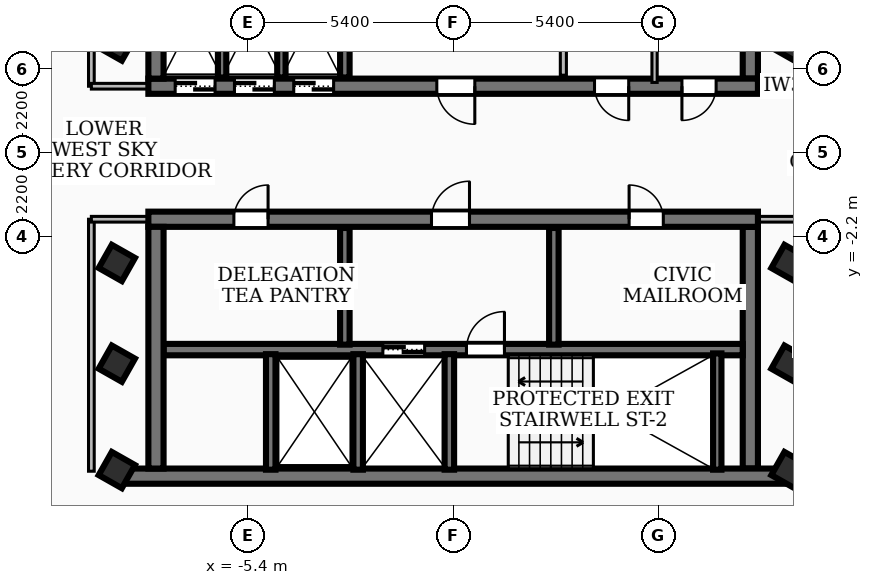
"""IFC4 building model, lengths in metres.
Left out: names, types, materials, properties, quantities, classifications, styles, units other than length and angle.
Written with IfcOpenShell. Run it as: python <this file> out.ifc"""

import sys

from ifc_helpers import new_model, si_unit, direction, frame, frame_2d, origin, origin_2d, place, context, subcontext, project, spatial, rectangle, extrude, element, fill, save


model = new_model("IFC4")
c1 = context("Model", 3, precision=1e-05, world=origin(), true_north=direction((0.0, 1.0)))
c2 = subcontext(c1, "Body", "Model", "MODEL_VIEW")
j1 = project(units=[si_unit("LENGTHUNIT", "METRE"), si_unit("PLANEANGLEUNIT", "RADIAN")], contexts=[c1])
p1 = place(None, origin())
s1 = spatial("IfcSite", under=j1, at=p1, CompositionType="ELEMENT")
p2 = place(p1, origin())
s2 = spatial("IfcBuilding", under=s1, at=p2, CompositionType="ELEMENT")
p3 = place(p2, frame((0.0, 0.0, 281.7)))
s3 = spatial("IfcBuildingStorey", under=s2, at=p3, CompositionType="ELEMENT", Elevation=281.7)
p4 = place(p3, frame((8.02, 1.75, 0.0), z_axis=(0.0, 0.0, 1.0), x_axis=(-1.0, 0.0, 0.0)))
e1 = element("IfcWall", 1, at=p4, inside=s3, PredefinedType="SHEAR", context=c2, shape_type="SweptSolid", body=[
    extrude(rectangle(XDim=16.04, YDim=0.4, at=frame_2d((8.02, 0.0))), origin(), (0.0, 0.0, 1.0), 3.12),
])
p5 = place(p4, frame((7.45, 0.0, 0.0)))
e2 = element("IfcOpeningElement", 2, at=p5, cuts=e1, PredefinedType="OPENING", context=c2, shape_type="SweptSolid", body=[
    extrude(rectangle(XDim=1.0, YDim=2.1, at=frame_2d((0.5, 1.05))), frame((0.0, 0.21, 0.0), z_axis=(0.0, -1.0, 0.0), x_axis=(1.0, 0.0, 0.0)), (0.0, 0.0, 1.0), 0.42),
])
p6 = place(p4, frame((14.285, 0.0, 0.0)))
e3 = element("IfcOpeningElement", 3, at=p6, cuts=e1, PredefinedType="OPENING", context=c2, shape_type="SweptSolid", body=[
    extrude(rectangle(XDim=1.05, YDim=2.15, at=frame_2d((0.525, 1.075))), frame((0.0, 0.21, 0.0), z_axis=(0.0, -1.0, 0.0), x_axis=(1.0, 0.0, 0.0)), (0.0, 0.0, 1.0), 0.42),
])
p7 = place(p4, frame((12.725, 0.0, 0.0)))
e4 = element("IfcOpeningElement", 4, at=p7, cuts=e1, PredefinedType="OPENING", context=c2, shape_type="SweptSolid", body=[
    extrude(rectangle(XDim=1.05, YDim=2.15, at=frame_2d((0.525, 1.075))), frame((0.0, 0.21, 0.0), z_axis=(0.0, -1.0, 0.0), x_axis=(1.0, 0.0, 0.0)), (0.0, 0.0, 1.0), 0.42),
])
p8 = place(p4, frame((11.165, 0.0, 0.0)))
e5 = element("IfcOpeningElement", 5, at=p8, cuts=e1, PredefinedType="OPENING", context=c2, shape_type="SweptSolid", body=[
    extrude(rectangle(XDim=1.05, YDim=2.15, at=frame_2d((0.525, 1.075))), frame((0.0, 0.21, 0.0), z_axis=(0.0, -1.0, 0.0), x_axis=(1.0, 0.0, 0.0)), (0.0, 0.0, 1.0), 0.42),
])
p9 = place(p4, frame((3.4, 0.0, 0.0)))
e6 = element("IfcOpeningElement", 6, at=p9, cuts=e1, PredefinedType="OPENING", context=c2, shape_type="SweptSolid", body=[
    extrude(rectangle(XDim=0.9, YDim=2.06, at=frame_2d((0.45, 1.03))), frame((0.0, 0.21, 0.0), z_axis=(0.0, -1.0, 0.0), x_axis=(1.0, 0.0, 0.0)), (0.0, 0.0, 1.0), 0.42),
])
p10 = place(p4, frame((1.1, 0.0, 0.0)))
e7 = element("IfcOpeningElement", 7, at=p10, cuts=e1, PredefinedType="OPENING", context=c2, shape_type="SweptSolid", body=[
    extrude(rectangle(XDim=0.9, YDim=2.06, at=frame_2d((0.45, 1.03))), frame((0.0, 0.21, 0.0), z_axis=(0.0, -1.0, 0.0), x_axis=(1.0, 0.0, 0.0)), (0.0, 0.0, 1.0), 0.42),
])
for number, where, z_axis, x_axis in (
    (8, (-7.82, 1.95, 0.0), (0.0, 0.0, 1.0), (0.0, 1.0, 0.0)),
    (9, (7.82, 8.31, 0.0), (0.0, 0.0, 1.0), (0.0, -1.0, 0.0)),
):
    element("IfcWall", number, at=place(p3, frame(where, z_axis=z_axis, x_axis=x_axis)), inside=s3, PredefinedType="SHEAR", context=c2, shape_type="SweptSolid", body=[
        extrude(rectangle(XDim=6.36, YDim=0.4, at=frame_2d((3.18, 0.0))), origin(), (0.0, 0.0, 1.0), 3.12),
    ])
p11 = place(p3, frame((8.78, -8.51, 0.0), z_axis=(0.0, 0.0, 1.0), x_axis=(-1.0, 0.0, 0.0)))
e10 = element("IfcWall", 10, at=p11, inside=s3, PredefinedType="SHEAR", context=c2, shape_type="SweptSolid", body=[
    extrude(rectangle(XDim=17.56, YDim=0.4, at=frame_2d((8.78, 0.0))), origin(), (0.0, 0.0, 1.0), 3.12),
])
p12 = place(p3, frame((-8.02, -1.75, 0.0), z_axis=(0.0, 0.0, 1.0), x_axis=(1.0, 0.0, 0.0)))
e11 = element("IfcWall", 11, at=p12, inside=s3, PredefinedType="SHEAR", context=c2, shape_type="SweptSolid", body=[
    extrude(rectangle(XDim=16.04, YDim=0.4, at=frame_2d((8.02, 0.0))), origin(), (0.0, 0.0, 1.0), 3.12),
])
p13 = place(p12, frame((7.45, 0.0, 0.0)))
e12 = element("IfcOpeningElement", 12, at=p13, cuts=e11, PredefinedType="OPENING", context=c2, shape_type="SweptSolid", body=[
    extrude(rectangle(XDim=1.0, YDim=2.1, at=frame_2d((0.5, 1.05))), frame((0.0, 0.21, 0.0), z_axis=(0.0, -1.0, 0.0), x_axis=(1.0, 0.0, 0.0)), (0.0, 0.0, 1.0), 0.42),
])
p14 = place(p12, frame((12.65, 0.0, 0.0)))
e13 = element("IfcOpeningElement", 13, at=p14, cuts=e11, PredefinedType="OPENING", context=c2, shape_type="SweptSolid", body=[
    extrude(rectangle(XDim=0.9, YDim=2.06, at=frame_2d((0.45, 1.03))), frame((0.0, 0.21, 0.0), z_axis=(0.0, -1.0, 0.0), x_axis=(1.0, 0.0, 0.0)), (0.0, 0.0, 1.0), 0.42),
])
p15 = place(p12, frame((2.25, 0.0, 0.0)))
e14 = element("IfcOpeningElement", 14, at=p15, cuts=e11, PredefinedType="OPENING", context=c2, shape_type="SweptSolid", body=[
    extrude(rectangle(XDim=0.9, YDim=2.06, at=frame_2d((0.45, 1.03))), frame((0.0, 0.21, 0.0), z_axis=(0.0, -1.0, 0.0), x_axis=(1.0, 0.0, 0.0)), (0.0, 0.0, 1.0), 0.42),
])
for number, where, z_axis, x_axis in (
    (15, (-7.82, -8.31, 0.0), (0.0, 0.0, 1.0), (0.0, 1.0, 0.0)),
    (16, (7.82, -1.95, 0.0), (0.0, 0.0, 1.0), (0.0, -1.0, 0.0)),
):
    element("IfcWall", number, at=place(p3, frame(where, z_axis=z_axis, x_axis=x_axis)), inside=s3, PredefinedType="SHEAR", context=c2, shape_type="SweptSolid", body=[
        extrude(rectangle(XDim=6.36, YDim=0.4, at=frame_2d((3.18, 0.0))), origin(), (0.0, 0.0, 1.0), 3.12),
    ])
p16 = place(p3, frame((-7.62, -5.18, 0.0), z_axis=(0.0, 0.0, 1.0), x_axis=(1.0, 0.0, 0.0)))
e17 = element("IfcWall", 17, at=p16, inside=s3, PredefinedType="SOLIDWALL", context=c2, shape_type="SweptSolid", body=[
    extrude(rectangle(XDim=15.24, YDim=0.3, at=frame_2d((7.62, 0.0))), origin(), (0.0, 0.0, 1.0), 3.12),
])
p17 = place(p16, frame((5.77, 0.0, 0.0)))
e18 = element("IfcOpeningElement", 18, at=p17, cuts=e17, PredefinedType="OPENING", context=c2, shape_type="SweptSolid", body=[
    extrude(rectangle(XDim=1.1, YDim=2.15, at=frame_2d((0.55, 1.075))), frame((0.0, 0.16, 0.0), z_axis=(0.0, -1.0, 0.0), x_axis=(1.0, 0.0, 0.0)), (0.0, 0.0, 1.0), 0.32),
])
p18 = place(p16, frame((7.97, 0.0, 0.0)))
e19 = element("IfcOpeningElement", 19, at=p18, cuts=e17, PredefinedType="OPENING", context=c2, shape_type="SweptSolid", body=[
    extrude(rectangle(XDim=1.0, YDim=2.1, at=frame_2d((0.5, 1.05))), frame((0.0, 0.16, 0.0), z_axis=(0.0, -1.0, 0.0), x_axis=(1.0, 0.0, 0.0)), (0.0, 0.0, 1.0), 0.32),
])
p19 = place(p3, frame((6.95, -8.34, 0.0), z_axis=(0.0, 0.0, 1.0), x_axis=(0.0, 1.0, 0.0)))
e20 = element("IfcWall", 20, at=p19, inside=s3, PredefinedType="SOLIDWALL", context=c2, shape_type="SweptSolid", body=[
    extrude(rectangle(XDim=3.06, YDim=0.22, at=frame_2d((1.53, 0.0))), origin(), (0.0, 0.0, 1.0), 3.12),
])
p20 = place(p3, frame((-2.85, 1.98, 0.0), z_axis=(0.0, 0.0, 1.0), x_axis=(0.0, 1.0, 0.0)))
e21 = element("IfcWall", 21, at=p20, inside=s3, PredefinedType="SOLIDWALL", context=c2, shape_type="SweptSolid", body=[
    extrude(rectangle(XDim=3.07, YDim=0.25, at=frame_2d((1.535, 0.0))), origin(), (0.0, 0.0, 1.0), 3.12),
])
for number, where, z_axis, x_axis in (
    (22, (-0.1, -8.34, 0.0), (0.0, 0.0, 1.0), (0.0, 1.0, 0.0)),
    (23, (-2.5, -8.34, 0.0), (0.0, 0.0, 1.0), (0.0, 1.0, 0.0)),
    (24, (-4.8, -8.34, 0.0), (0.0, 0.0, 1.0), (0.0, 1.0, 0.0)),
):
    element("IfcWall", number, at=place(p3, frame(where, z_axis=z_axis, x_axis=x_axis)), inside=s3, PredefinedType="SOLIDWALL", context=c2, shape_type="SweptSolid", body=[
        extrude(rectangle(XDim=3.04, YDim=0.25, at=frame_2d((1.52, 0.0))), origin(), (0.0, 0.0, 1.0), 3.12),
    ])
for number, where, z_axis, x_axis in (
    (25, (-2.85, -5.05, 0.0), (0.0, 0.0, 1.0), (0.0, 1.0, 0.0)),
    (26, (2.65, -5.05, 0.0), (0.0, 0.0, 1.0), (0.0, 1.0, 0.0)),
):
    element("IfcWall", number, at=place(p3, frame(where, z_axis=z_axis, x_axis=x_axis)), inside=s3, PredefinedType="SOLIDWALL", context=c2, shape_type="SweptSolid", body=[
        extrude(rectangle(XDim=3.07, YDim=0.25, at=frame_2d((1.535, 0.0))), origin(), (0.0, 0.0, 1.0), 3.12),
    ])
for number, where, z_axis, x_axis in (
    (27, (-6.08, 1.98, 0.0), (0.0, 0.0, 1.0), (0.0, 1.0, 0.0)),
    (28, (-4.52, 1.98, 0.0), (0.0, 0.0, 1.0), (0.0, 1.0, 0.0)),
):
    element("IfcWall", number, at=place(p3, frame(where, z_axis=z_axis, x_axis=x_axis)), inside=s3, PredefinedType="SOLIDWALL", context=c2, shape_type="SweptSolid", body=[
        extrude(rectangle(XDim=3.07, YDim=0.22, at=frame_2d((1.535, 0.0))), origin(), (0.0, 0.0, 1.0), 3.12),
    ])
for number, where, z_axis, x_axis in (
    (29, (-8.85, -5.55, 0.0), (0.0, 0.0, 1.0), (0.493, 0.87, 0.0)),
    (30, (-8.85, -2.9, 0.0), (0.0, 0.0, 1.0), (0.493, 0.87, 0.0)),
    (31, (-8.85, 2.9, 0.0), (0.0, 0.0, 1.0), (0.493, 0.87, 0.0)),
    (32, (8.85, -5.55, 0.0), (0.0, 0.0, 1.0), (0.493, 0.87, 0.0)),
    (33, (8.85, -2.9, 0.0), (0.0, 0.0, 1.0), (0.493, 0.87, 0.0)),
    (34, (8.85, 2.9, 0.0), (0.0, 0.0, 1.0), (0.493, 0.87, 0.0)),
    (35, (8.85, -8.35, 0.0), (0.0, 0.0, 1.0), (0.493, 0.87, 0.0)),
    (36, (-8.85, -8.35, 0.0), (0.0, 0.0, 1.0), (0.493, 0.87, 0.0)),
):
    element("IfcColumn", number, at=place(p3, frame(where, z_axis=z_axis, x_axis=x_axis)), inside=s3, PredefinedType="COLUMN", context=c2, shape_type="SweptSolid", body=[
        extrude(rectangle(XDim=0.7, YDim=0.7, at=origin_2d()), origin(), (0.0, 0.0, 1.0), 3.42),
    ])
p21 = place(p3, frame((4.16, -18.96, 0.0), z_axis=(0.0, 0.0, 1.0), x_axis=(-0.870210232131, 0.492680577956, 0.0)))
e37 = element("IfcWall", 37, at=p21, inside=s3, PredefinedType="SOLIDWALL", context=c2, shape_type="SweptSolid", body=[
    extrude(rectangle(XDim=25.923, YDim=0.2, at=frame_2d((12.962, 0.0))), origin(), (0.0, 0.0, 1.0), 3.12),
])
p22 = place(p21, frame((19.32, 0.0, 0.85)))
e38 = element("IfcOpeningElement", 38, at=p22, cuts=e37, PredefinedType="OPENING", context=c2, shape_type="SweptSolid", body=[
    extrude(rectangle(XDim=1.8, YDim=1.6, at=frame_2d((0.9, 0.8))), frame((0.0, 0.11, 0.0), z_axis=(0.0, -1.0, 0.0), x_axis=(1.0, 0.0, 0.0)), (0.0, 0.0, 1.0), 0.22),
])
p23 = place(p3, frame((2.9, 2.04, 0.0), z_axis=(0.0, 0.0, 1.0), x_axis=(0.0, 1.0, 0.0)))
e39 = element("IfcWall", 39, at=p23, inside=s3, PredefinedType="PARTITIONING", context=c2, shape_type="SweptSolid", body=[
    extrude(rectangle(XDim=2.94, YDim=0.16, at=frame_2d((1.47, 0.0))), origin(), (0.0, 0.0, 1.0), 2.35),
])
p24 = place(p23, frame((1.82, 0.0, 0.0)))
e40 = element("IfcOpeningElement", 40, at=p24, cuts=e39, PredefinedType="OPENING", context=c2, shape_type="SweptSolid", body=[
    extrude(rectangle(XDim=0.9, YDim=2.06, at=frame_2d((0.45, 1.03))), frame((0.0, 0.09, 0.0), z_axis=(0.0, -1.0, 0.0), x_axis=(1.0, 0.0, 0.0)), (0.0, 0.0, 1.0), 0.18),
])
p25 = place(p3, frame((5.3, 1.85, 0.0), z_axis=(0.0, 0.0, 1.0), x_axis=(0.0, 1.0, 0.0)))
e41 = element("IfcWall", 41, at=p25, inside=s3, PredefinedType="PARTITIONING", context=c2, shape_type="SweptSolid", body=[
    extrude(rectangle(XDim=1.89, YDim=0.138, at=frame_2d((0.945, 0.0))), origin(), (0.0, 0.0, 1.0), 2.35),
])
p26 = place(p3, frame((-9.52, 1.75, 0.0), z_axis=(0.0, 0.0, 1.0), x_axis=(0.0, 1.0, 0.0)))
e42 = element("IfcWall", 42, at=p26, inside=s3, PredefinedType="PARTITIONING", context=c2, shape_type="SweptSolid", body=[
    extrude(rectangle(XDim=6.63, YDim=0.15, at=frame_2d((3.315, 0.0))), origin(), (0.0, 0.0, 1.0), 2.49),
])
p27 = place(p3, frame((-7.85, 1.75, 0.0), z_axis=(0.0, 0.0, 1.0), x_axis=(-1.0, 0.0, 0.0)))
e43 = element("IfcWall", 43, at=p27, inside=s3, PredefinedType="PARTITIONING", context=c2, shape_type="SweptSolid", body=[
    extrude(rectangle(XDim=1.67, YDim=0.15, at=frame_2d((0.835, 0.0))), origin(), (0.0, 0.0, 1.0), 2.35),
])
p28 = place(p3, frame((-9.52, -8.38, 0.0), z_axis=(0.0, 0.0, 1.0), x_axis=(0.0, 1.0, 0.0)))
e44 = element("IfcWall", 44, at=p28, inside=s3, PredefinedType="PARTITIONING", context=c2, shape_type="SweptSolid", body=[
    extrude(rectangle(XDim=6.63, YDim=0.15, at=frame_2d((3.315, 0.0))), origin(), (0.0, 0.0, 1.0), 3.12),
])
for number, where, z_axis, x_axis in (
    (45, (-7.85, -1.75, 0.0), (0.0, 0.0, 1.0), (-1.0, 0.0, 0.0)),
    (46, (7.85, 1.75, 0.0), (0.0, 0.0, 1.0), (1.0, 0.0, 0.0)),
    (47, (7.85, -1.75, 0.0), (0.0, 0.0, 1.0), (1.0, 0.0, 0.0)),
):
    element("IfcWall", number, at=place(p3, frame(where, z_axis=z_axis, x_axis=x_axis)), inside=s3, PredefinedType="PARTITIONING", context=c2, shape_type="SweptSolid", body=[
        extrude(rectangle(XDim=1.67, YDim=0.15, at=frame_2d((0.835, 0.0))), origin(), (0.0, 0.0, 1.0), 2.35),
    ])
p29 = place(p3, frame((-17.619, -2.113, 0.0), z_axis=(0.0, 0.0, 1.0), x_axis=(0.492746831558, 0.870172718482, 0.0)))
e48 = element("IfcWall", 48, at=p29, inside=s3, PredefinedType="PARTITIONING", context=c2, shape_type="SweptSolid", body=[
    extrude(rectangle(XDim=20.54, YDim=0.11, at=frame_2d((10.27, 0.0))), origin(), (0.0, 0.0, 1.0), 2.49),
])
p30 = place(p29, frame((11.36, 0.0, 0.0)))
e49 = element("IfcOpeningElement", 49, at=p30, cuts=e48, PredefinedType="OPENING", context=c2, shape_type="SweptSolid", body=[
    extrude(rectangle(XDim=0.86, YDim=2.04, at=frame_2d((0.43, 1.02))), frame((0.0, 0.065, 0.0), z_axis=(0.0, -1.0, 0.0), x_axis=(1.0, 0.0, 0.0)), (0.0, 0.0, 1.0), 0.13),
])
p31 = place(p29, frame((9.92, 0.0, 0.0)))
e50 = element("IfcOpeningElement", 50, at=p31, cuts=e48, PredefinedType="OPENING", context=c2, shape_type="SweptSolid", body=[
    extrude(rectangle(XDim=0.86, YDim=2.04, at=frame_2d((0.43, 1.02))), frame((0.0, 0.065, 0.0), z_axis=(0.0, -1.0, 0.0), x_axis=(1.0, 0.0, 0.0)), (0.0, 0.0, 1.0), 0.13),
])
p32 = place(p3, frame((17.619, 2.113, 0.0), z_axis=(0.0, 0.0, 1.0), x_axis=(-0.492746831558, -0.870172718482, 0.0)))
e51 = element("IfcWall", 51, at=p32, inside=s3, PredefinedType="PARTITIONING", context=c2, shape_type="SweptSolid", body=[
    extrude(rectangle(XDim=20.54, YDim=0.11, at=frame_2d((10.27, 0.0))), origin(), (0.0, 0.0, 1.0), 2.49),
])
p33 = place(p32, frame((11.36, 0.0, 0.0)))
e52 = element("IfcOpeningElement", 52, at=p33, cuts=e51, PredefinedType="OPENING", context=c2, shape_type="SweptSolid", body=[
    extrude(rectangle(XDim=0.86, YDim=2.04, at=frame_2d((0.43, 1.02))), frame((0.0, 0.065, 0.0), z_axis=(0.0, -1.0, 0.0), x_axis=(1.0, 0.0, 0.0)), (0.0, 0.0, 1.0), 0.13),
])
p34 = place(p32, frame((9.92, 0.0, 0.0)))
e53 = element("IfcOpeningElement", 53, at=p34, cuts=e51, PredefinedType="OPENING", context=c2, shape_type="SweptSolid", body=[
    extrude(rectangle(XDim=0.86, YDim=2.04, at=frame_2d((0.43, 1.02))), frame((0.0, 0.065, 0.0), z_axis=(0.0, -1.0, 0.0), x_axis=(1.0, 0.0, 0.0)), (0.0, 0.0, 1.0), 0.13),
])
p35 = place(p5, origin())
e54 = element("IfcDoor", 54, at=p35, inside=s3, OperationType="SINGLE_SWING_LEFT", PredefinedType="DOOR", context=c2, shape_type="SweptSolid", body=[
    extrude(rectangle(XDim=1.0, YDim=2.1, at=frame_2d((0.5, 1.05))), frame((0.0, 0.025, 0.0), z_axis=(0.0, -1.0, 0.0), x_axis=(1.0, 0.0, 0.0)), (0.0, 0.0, 1.0), 0.05),
])
fill(e2, e54)
p36 = place(p13, origin())
e55 = element("IfcDoor", 55, at=p36, inside=s3, OperationType="SINGLE_SWING_RIGHT", PredefinedType="DOOR", context=c2, shape_type="SweptSolid", body=[
    extrude(rectangle(XDim=1.0, YDim=2.1, at=frame_2d((0.5, 1.05))), frame((0.0, 0.025, 0.0), z_axis=(0.0, -1.0, 0.0), x_axis=(1.0, 0.0, 0.0)), (0.0, 0.0, 1.0), 0.05),
])
fill(e12, e55)
p37 = place(p17, origin())
e56 = element("IfcDoor", 56, at=p37, inside=s3, OperationType="DOUBLE_DOOR_SLIDING", PredefinedType="DOOR", context=c2, shape_type="SweptSolid", body=[
    extrude(rectangle(XDim=1.1, YDim=2.15, at=frame_2d((0.55, 1.075))), frame((0.0, 0.025, 0.0), z_axis=(0.0, -1.0, 0.0), x_axis=(1.0, 0.0, 0.0)), (0.0, 0.0, 1.0), 0.05),
])
fill(e18, e56)
p38 = place(p18, origin())
e57 = element("IfcDoor", 57, at=p38, inside=s3, OperationType="SINGLE_SWING_RIGHT", PredefinedType="DOOR", context=c2, shape_type="SweptSolid", body=[
    extrude(rectangle(XDim=1.0, YDim=2.1, at=frame_2d((0.5, 1.05))), frame((0.0, 0.025, 0.0), z_axis=(0.0, -1.0, 0.0), x_axis=(1.0, 0.0, 0.0)), (0.0, 0.0, 1.0), 0.05),
])
fill(e19, e57)
p39 = place(p6, origin())
e58 = element("IfcDoor", 58, at=p39, inside=s3, OperationType="DOUBLE_DOOR_SLIDING", PredefinedType="DOOR", context=c2, shape_type="SweptSolid", body=[
    extrude(rectangle(XDim=1.05, YDim=2.15, at=frame_2d((0.525, 1.075))), frame((0.0, 0.025, 0.0), z_axis=(0.0, -1.0, 0.0), x_axis=(1.0, 0.0, 0.0)), (0.0, 0.0, 1.0), 0.05),
])
fill(e3, e58)
p40 = place(p7, origin())
e59 = element("IfcDoor", 59, at=p40, inside=s3, OperationType="DOUBLE_DOOR_SLIDING", PredefinedType="DOOR", context=c2, shape_type="SweptSolid", body=[
    extrude(rectangle(XDim=1.05, YDim=2.15, at=frame_2d((0.525, 1.075))), frame((0.0, 0.025, 0.0), z_axis=(0.0, -1.0, 0.0), x_axis=(1.0, 0.0, 0.0)), (0.0, 0.0, 1.0), 0.05),
])
fill(e4, e59)
p41 = place(p8, origin())
e60 = element("IfcDoor", 60, at=p41, inside=s3, OperationType="DOUBLE_DOOR_SLIDING", PredefinedType="DOOR", context=c2, shape_type="SweptSolid", body=[
    extrude(rectangle(XDim=1.05, YDim=2.15, at=frame_2d((0.525, 1.075))), frame((0.0, 0.025, 0.0), z_axis=(0.0, -1.0, 0.0), x_axis=(1.0, 0.0, 0.0)), (0.0, 0.0, 1.0), 0.05),
])
fill(e5, e60)
p42 = place(p14, origin())
e61 = element("IfcDoor", 61, at=p42, inside=s3, OperationType="SINGLE_SWING_LEFT", PredefinedType="DOOR", context=c2, shape_type="SweptSolid", body=[
    extrude(rectangle(XDim=0.9, YDim=2.06, at=frame_2d((0.45, 1.03))), frame((0.0, 0.025, 0.0), z_axis=(0.0, -1.0, 0.0), x_axis=(1.0, 0.0, 0.0)), (0.0, 0.0, 1.0), 0.05),
])
fill(e13, e61)
p43 = place(p15, origin())
e62 = element("IfcDoor", 62, at=p43, inside=s3, OperationType="SINGLE_SWING_RIGHT", PredefinedType="DOOR", context=c2, shape_type="SweptSolid", body=[
    extrude(rectangle(XDim=0.9, YDim=2.06, at=frame_2d((0.45, 1.03))), frame((0.0, 0.025, 0.0), z_axis=(0.0, -1.0, 0.0), x_axis=(1.0, 0.0, 0.0)), (0.0, 0.0, 1.0), 0.05),
])
fill(e14, e62)
p44 = place(p9, origin())
e63 = element("IfcDoor", 63, at=p44, inside=s3, OperationType="SINGLE_SWING_LEFT", PredefinedType="DOOR", context=c2, shape_type="SweptSolid", body=[
    extrude(rectangle(XDim=0.9, YDim=2.06, at=frame_2d((0.45, 1.03))), frame((0.0, 0.025, 0.0), z_axis=(0.0, -1.0, 0.0), x_axis=(1.0, 0.0, 0.0)), (0.0, 0.0, 1.0), 0.05),
])
fill(e6, e63)
p45 = place(p10, origin())
e64 = element("IfcDoor", 64, at=p45, inside=s3, OperationType="SINGLE_SWING_RIGHT", PredefinedType="DOOR", context=c2, shape_type="SweptSolid", body=[
    extrude(rectangle(XDim=0.9, YDim=2.06, at=frame_2d((0.45, 1.03))), frame((0.0, 0.025, 0.0), z_axis=(0.0, -1.0, 0.0), x_axis=(1.0, 0.0, 0.0)), (0.0, 0.0, 1.0), 0.05),
])
fill(e7, e64)
save(model, sys.argv[1])
